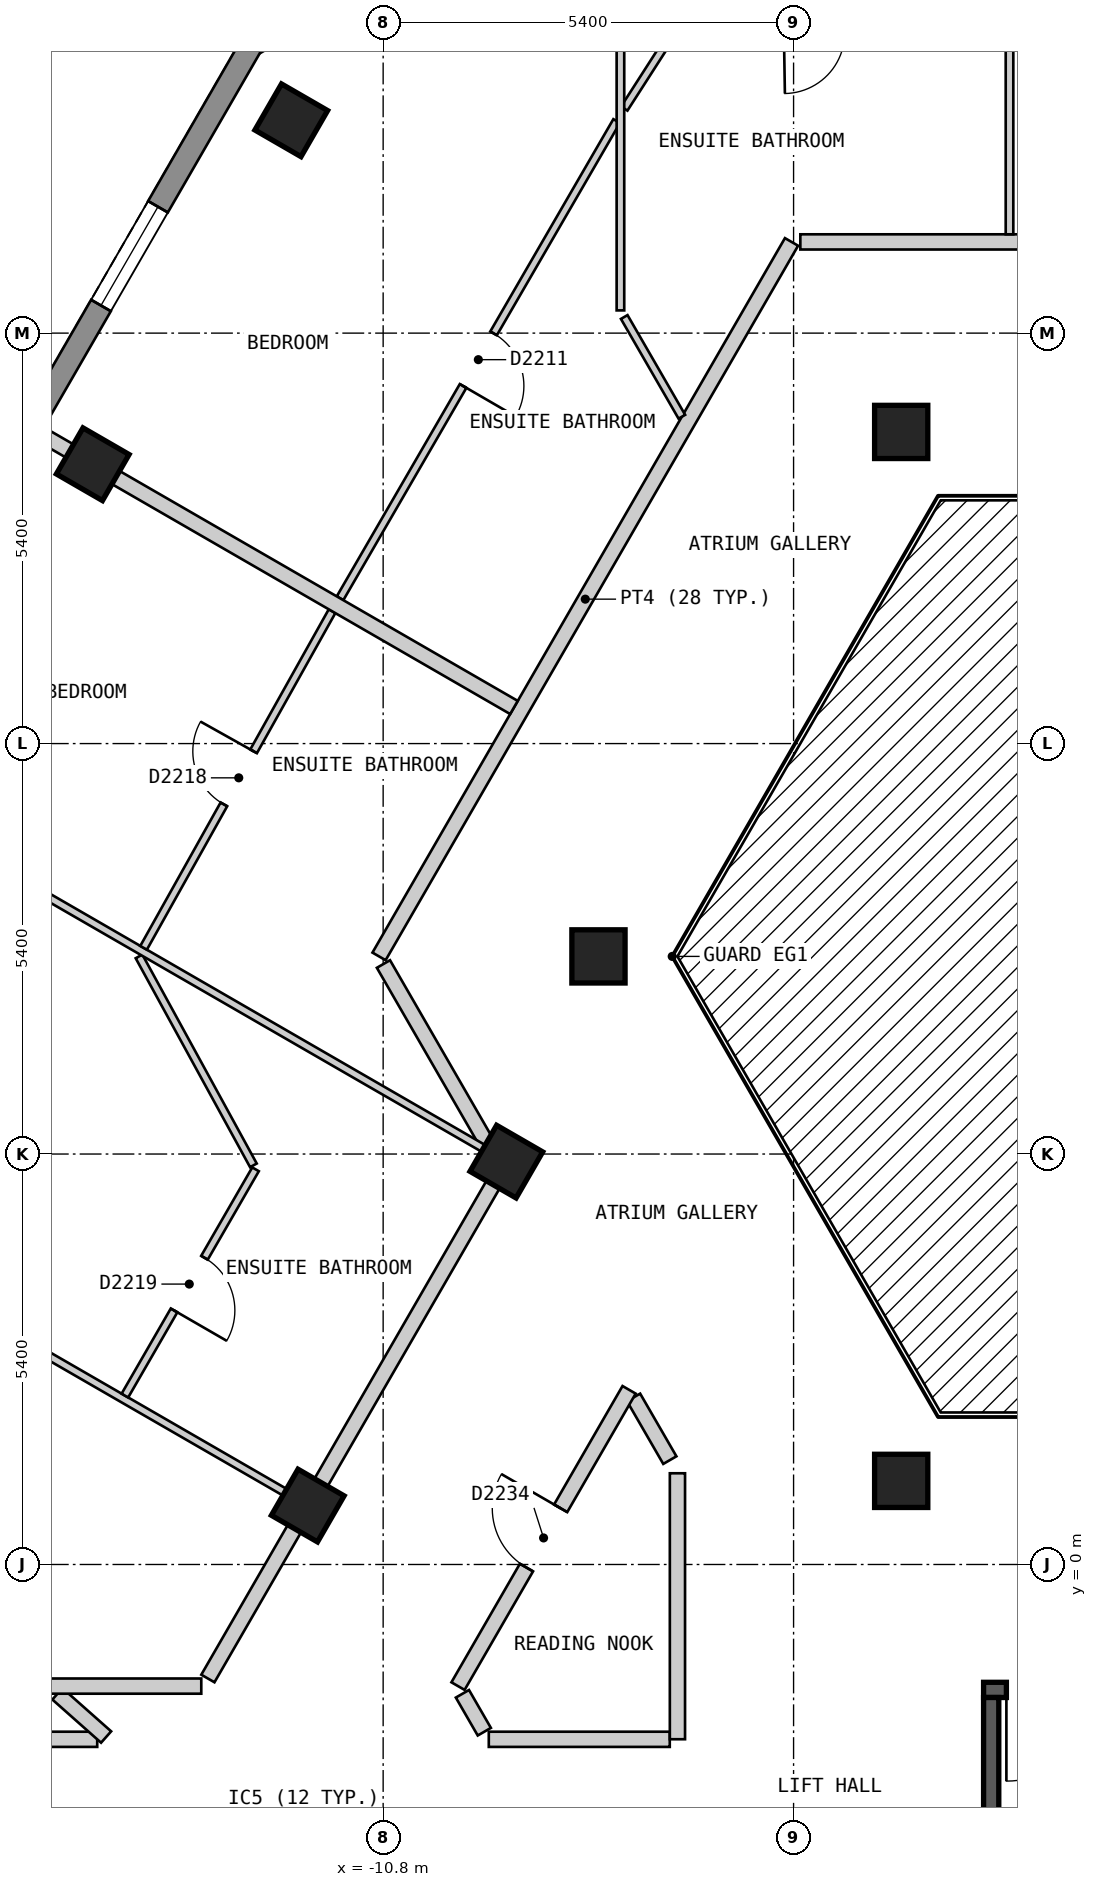
"""IFC4 building model, lengths in metres.
Left out: names, types, materials, properties, quantities, classifications, styles, units other than length and angle.
Written with IfcOpenShell. Run it as: python <this file> out.ifc"""

import sys

from ifc_helpers import new_model, si_unit, direction, frame, frame_2d, origin, origin_2d, place, context, subcontext, project, spatial, polyline, rectangle, outline, extrude, element, fill, save


model = new_model("IFC4")
c1 = context("Model", 3, precision=1e-05, world=origin(), true_north=direction((0.0, 1.0)))
c2 = subcontext(c1, "Body", "Model", "MODEL_VIEW")
j1 = project(units=[si_unit("LENGTHUNIT", "METRE"), si_unit("PLANEANGLEUNIT", "RADIAN")], contexts=[c1])
p1 = place(None, origin())
s1 = spatial("IfcSite", under=j1, at=p1, CompositionType="ELEMENT")
p2 = place(p1, origin())
s2 = spatial("IfcBuilding", under=s1, at=p2, CompositionType="ELEMENT")
p3 = place(p2, frame((0.0, 0.0, 223.8)))
s3 = spatial("IfcBuildingStorey", under=s2, at=p3, CompositionType="ELEMENT", Elevation=223.8)
for number, where, z_axis, x_axis in (
    (1, (-12.009, 19.0, 0.0), (0.0, 0.0, 1.0), (-0.5, -0.866, 0.0)),
    (2, (-14.621, 14.475, 0.0), (0.0, 0.0, 1.0), (-0.5, -0.866, 0.0)),
    (3, (-3.984, 14.9, 0.0), (0.0, 0.0, 1.0), (1.0, 0.0, 0.0)),
    (4, (-7.967, 8.0, 0.0), (0.0, 0.0, 1.0), (1.0, 0.0, 0.0)),
    (5, (-9.179, 5.3, 0.0), (0.0, 0.0, 1.0), (-0.5, -0.866, 0.0)),
    (6, (-3.984, 1.1, 0.0), (0.0, 0.0, 1.0), (1.0, 0.0, 0.0)),
    (7, (-11.792, 0.775, 0.0), (0.0, 0.0, 1.0), (-0.5, -0.866, 0.0)),
):
    element("IfcColumn", number, at=place(p3, frame(where, z_axis=z_axis, x_axis=x_axis)), inside=s3, PredefinedType="COLUMN", context=c2, shape_type="SweptSolid", body=[
        extrude(rectangle(XDim=0.7, YDim=0.7, at=origin_2d()), origin(), (0.0, 0.0, 1.0), 3.0),
    ])
p4 = place(p3, frame((-8.239, 22.47, 0.0), z_axis=(0.0, 0.0, 1.0), x_axis=(-0.866022959057, -0.500004234368, 0.0)))
e8 = element("IfcWall", 8, at=p4, inside=s3, PredefinedType="SOLIDWALL", context=c2, shape_type="SweptSolid", body=[
    extrude(outline(polyline([(0.0, -0.15), (5.0, -0.15), (4.92, 0.15), (0.08, 0.15), (0.0, -0.15)])), origin(), (0.0, 0.0, 1.0), 2.7),
])
p5 = place(p4, frame((0.65, 0.0, 0.15)))
e9 = element("IfcOpeningElement", 9, at=p5, cuts=e8, PredefinedType="OPENING", context=c2, shape_type="SweptSolid", body=[
    extrude(rectangle(XDim=1.2, YDim=2.1, at=frame_2d((0.6, 1.05))), frame((0.0, 0.16, 0.0), z_axis=(0.0, -1.0, 0.0), x_axis=(1.0, 0.0, 0.0)), (0.0, 0.0, 1.0), 0.32),
])
p6 = place(p3, frame((-12.514, 20.025, 0.0), z_axis=(0.0, 0.0, 1.0), x_axis=(-0.500003656944, -0.866023292436, 0.0)))
e10 = element("IfcWall", 10, at=p6, inside=s3, PredefinedType="SOLIDWALL", context=c2, shape_type="SweptSolid", body=[
    extrude(outline(polyline([(0.0, -0.15), (22.17, -0.15), (22.09, 0.15), (0.08, 0.15), (0.0, -0.15)])), origin(), (0.0, 0.0, 1.0), 2.7),
])
p7 = place(p6, frame((2.497, 0.0, 0.15)))
e11 = element("IfcOpeningElement", 11, at=p7, cuts=e10, PredefinedType="OPENING", context=c2, shape_type="SweptSolid", body=[
    extrude(rectangle(XDim=1.5, YDim=2.1, at=frame_2d((0.75, 1.05))), frame((0.0, 0.16, 0.0), z_axis=(0.0, -1.0, 0.0), x_axis=(1.0, 0.0, 0.0)), (0.0, 0.0, 1.0), 0.32),
])
p8 = place(p6, frame((7.722, 0.0, 0.15)))
e12 = element("IfcOpeningElement", 12, at=p8, cuts=e10, PredefinedType="OPENING", context=c2, shape_type="SweptSolid", body=[
    extrude(rectangle(XDim=1.5, YDim=2.1, at=frame_2d((0.75, 1.05))), frame((0.0, 0.16, 0.0), z_axis=(0.0, -1.0, 0.0), x_axis=(1.0, 0.0, 0.0)), (0.0, 0.0, 1.0), 0.32),
])
p9 = place(p6, frame((12.948, 0.0, 0.15)))
e13 = element("IfcOpeningElement", 13, at=p9, cuts=e10, PredefinedType="OPENING", context=c2, shape_type="SweptSolid", body=[
    extrude(rectangle(XDim=1.5, YDim=2.1, at=frame_2d((0.75, 1.05))), frame((0.0, 0.16, 0.0), z_axis=(0.0, -1.0, 0.0), x_axis=(1.0, 0.0, 0.0)), (0.0, 0.0, 1.0), 0.32),
])
p10 = place(p6, frame((18.173, 0.0, 0.15)))
e14 = element("IfcOpeningElement", 14, at=p10, cuts=e10, PredefinedType="OPENING", context=c2, shape_type="SweptSolid", body=[
    extrude(rectangle(XDim=1.5, YDim=2.1, at=frame_2d((0.75, 1.05))), frame((0.0, 0.16, 0.0), z_axis=(0.0, -1.0, 0.0), x_axis=(1.0, 0.0, 0.0)), (0.0, 0.0, 1.0), 0.32),
])
p11 = place(p3, frame((-2.9, -1.65, 0.0), z_axis=(0.0, 0.0, 1.0), x_axis=(1.0, 0.0, 0.0)))
e15 = element("IfcWall", 15, at=p11, inside=s3, PredefinedType="SOLIDWALL", context=c2, shape_type="SweptSolid", body=[
    extrude(rectangle(XDim=5.8, YDim=0.2, at=frame_2d((2.9, 0.0))), origin(), (0.0, 0.0, 1.0), 2.7),
])
p12 = place(p11, frame((0.3, 0.0, 0.0)))
e16 = element("IfcOpeningElement", 16, at=p12, cuts=e15, PredefinedType="OPENING", context=c2, shape_type="SweptSolid", body=[
    extrude(rectangle(XDim=1.2, YDim=2.1, at=frame_2d((0.6, 1.05))), frame((0.0, 0.11, 0.0), z_axis=(0.0, -1.0, 0.0), x_axis=(1.0, 0.0, 0.0)), (0.0, 0.0, 1.0), 0.22),
])
p13 = place(p3, frame((-2.8, -4.5, 0.0), z_axis=(0.0, 0.0, 1.0), x_axis=(0.0, 1.0, 0.0)))
e17 = element("IfcWall", 17, at=p13, inside=s3, PredefinedType="SOLIDWALL", context=c2, shape_type="SweptSolid", body=[
    extrude(rectangle(XDim=2.75, YDim=0.2, at=frame_2d((1.375, 0.0))), origin(), (0.0, 0.0, 1.0), 2.7),
])
p14 = place(p3, frame((-10.796, 7.9, 0.0), z_axis=(0.0, 0.0, 1.0), x_axis=(0.499674397761, -0.866213308731, 0.0)))
e18 = element("IfcWall", 18, at=p14, inside=s3, PredefinedType="PARTITIONING", context=c2, shape_type="SweptSolid", body=[
    extrude(rectangle(XDim=2.785, YDim=0.2, at=frame_2d((1.393, 0.0))), origin(), (0.0, 0.0, 1.0), 2.7),
])
p15 = place(p3, frame((-7.505, 2.198, 0.0), z_axis=(0.0, 0.0, 1.0), x_axis=(0.500409926597, -0.865788603161, 0.0)))
e19 = element("IfcWall", 19, at=p15, inside=s3, PredefinedType="PARTITIONING", context=c2, shape_type="SweptSolid", body=[
    extrude(rectangle(XDim=0.953, YDim=0.2, at=frame_2d((0.477, 0.0))), origin(), (0.0, 0.0, 1.0), 2.7),
])
p16 = place(p3, frame((-9.757, -1.701, 0.0), z_axis=(0.0, 0.0, 1.0), x_axis=(0.49996696679, -0.866044474677, 0.0)))
e20 = element("IfcWall", 20, at=p16, inside=s3, PredefinedType="PARTITIONING", context=c2, shape_type="SweptSolid", body=[
    extrude(rectangle(XDim=0.576, YDim=0.2, at=frame_2d((0.288, 0.0))), origin(), (0.0, 0.0, 1.0), 2.7),
])
p17 = place(p3, frame((-15.899, -2.3, 0.0), z_axis=(0.0, 0.0, 1.0), x_axis=(1.0, 0.0, 0.0)))
e21 = element("IfcWall", 21, at=p17, inside=s3, PredefinedType="PARTITIONING", context=c2, shape_type="SweptSolid", body=[
    extrude(rectangle(XDim=1.337, YDim=0.2, at=frame_2d((0.668, 0.0))), origin(), (0.0, 0.0, 1.0), 2.7),
])
p18 = place(p3, frame((-9.41, -2.3, 0.0), z_axis=(0.0, 0.0, 1.0), x_axis=(1.0, 0.0, 0.0)))
e22 = element("IfcWall", 22, at=p18, inside=s3, PredefinedType="PARTITIONING", context=c2, shape_type="SweptSolid", body=[
    extrude(rectangle(XDim=2.381, YDim=0.2, at=frame_2d((1.19, 0.0))), origin(), (0.0, 0.0, 1.0), 2.7),
])
p19 = place(p3, frame((-5.311, 17.4, 0.0), z_axis=(0.0, 0.0, 1.0), x_axis=(1.0, 0.0, 0.0)))
e23 = element("IfcWall", 23, at=p19, inside=s3, PredefinedType="PARTITIONING", context=c2, shape_type="SweptSolid", body=[
    extrude(rectangle(XDim=10.737, YDim=0.2, at=frame_2d((5.369, 0.0))), origin(), (0.0, 0.0, 1.0), 2.7),
])
p20 = place(p19, frame((4.812, 0.0, 0.0)))
e24 = element("IfcOpeningElement", 24, at=p20, cuts=e23, PredefinedType="OPENING", context=c2, shape_type="SweptSolid", body=[
    extrude(rectangle(XDim=1.0, YDim=2.1, at=frame_2d((0.5, 1.05))), frame((0.0, 0.11, 0.0), z_axis=(0.0, -1.0, 0.0), x_axis=(1.0, 0.0, 0.0)), (0.0, 0.0, 1.0), 0.22),
])
p21 = place(p3, frame((-9.815, -1.6, 0.0), z_axis=(0.0, 0.0, 1.0), x_axis=(0.500058909736, 0.865991389561, 0.0)))
e25 = element("IfcWall", 25, at=p21, inside=s3, PredefinedType="PARTITIONING", context=c2, shape_type="SweptSolid", body=[
    extrude(rectangle(XDim=4.501, YDim=0.2, at=frame_2d((2.251, 0.0))), origin(), (0.0, 0.0, 1.0), 2.7),
])
p22 = place(p21, frame((1.801, 0.0, 0.0)))
e26 = element("IfcOpeningElement", 26, at=p22, cuts=e25, PredefinedType="OPENING", context=c2, shape_type="SweptSolid", body=[
    extrude(rectangle(XDim=0.9, YDim=2.1, at=frame_2d((0.45, 1.05))), frame((0.0, 0.11, 0.0), z_axis=(0.0, -1.0, 0.0), x_axis=(1.0, 0.0, 0.0)), (0.0, 0.0, 1.0), 0.22),
])
p23 = place(p3, frame((-13.106, -1.5, 0.0), z_axis=(0.0, 0.0, 1.0), x_axis=(0.500025705601, 0.86601056214, 0.0)))
e27 = element("IfcWall", 27, at=p23, inside=s3, PredefinedType="PARTITIONING", context=c2, shape_type="SweptSolid", body=[
    extrude(rectangle(XDim=7.735, YDim=0.2, at=frame_2d((3.868, 0.0))), origin(), (0.0, 0.0, 1.0), 2.7),
])
p24 = place(p3, frame((-10.854, 8.0, 0.0), z_axis=(0.0, 0.0, 1.0), x_axis=(0.499997637144, 0.866026767976, 0.0)))
e28 = element("IfcWall", 28, at=p24, inside=s3, PredefinedType="PARTITIONING", context=c2, shape_type="SweptSolid", body=[
    extrude(rectangle(XDim=10.854, YDim=0.2, at=frame_2d((5.427, 0.0))), origin(), (0.0, 0.0, 1.0), 2.7),
])
p25 = place(p3, frame((-6.928, -2.299, 0.0), z_axis=(0.0, 0.0, 1.0), x_axis=(0.0, 1.0, 0.0)))
e29 = element("IfcWall", 29, at=p25, inside=s3, PredefinedType="PARTITIONING", context=c2, shape_type="SweptSolid", body=[
    extrude(rectangle(XDim=3.499, YDim=0.2, at=frame_2d((1.75, 0.0))), origin(), (0.0, 0.0, 1.0), 2.7),
])
p26 = place(p3, frame((-7.628, 16.412, 0.0), z_axis=(0.0, 0.0, 1.0), x_axis=(0.500159472144, -0.86593331292, 0.0)))
e30 = element("IfcWall", 30, at=p26, inside=s3, PredefinedType="PARTITIONING", context=c2, shape_type="SweptSolid", body=[
    extrude(rectangle(XDim=1.515, YDim=0.1, at=frame_2d((0.758, 0.0))), origin(), (0.0, 0.0, 1.0), 2.7),
])
p27 = place(p3, frame((-14.012, 8.0, 0.0), z_axis=(0.0, 0.0, 1.0), x_axis=(0.480183343847, -0.877168145963, 0.0)))
e31 = element("IfcWall", 31, at=p27, inside=s3, PredefinedType="PARTITIONING", context=c2, shape_type="SweptSolid", body=[
    extrude(rectangle(XDim=3.134, YDim=0.1, at=frame_2d((1.567, 0.0))), origin(), (0.0, 0.0, 1.0), 2.7),
])
p28 = place(p3, frame((-2.559, 20.17, 0.0), z_axis=(0.0, 0.0, 1.0), x_axis=(0.0, -1.0, 0.0)))
e32 = element("IfcWall", 32, at=p28, inside=s3, PredefinedType="PARTITIONING", context=c2, shape_type="SweptSolid", body=[
    extrude(rectangle(XDim=2.67, YDim=0.1, at=frame_2d((1.335, 0.0))), origin(), (0.0, 0.0, 1.0), 2.7),
])
p29 = place(p3, frame((-20.539, 5.825, 0.0), z_axis=(0.0, 0.0, 1.0), x_axis=(0.866089650643, -0.499888704662, 0.0)))
e33 = element("IfcWall", 33, at=p29, inside=s3, PredefinedType="PARTITIONING", context=c2, shape_type="SweptSolid", body=[
    extrude(rectangle(XDim=10.0, YDim=0.1, at=frame_2d((5.0, 0.0))), origin(), (0.0, 0.0, 1.0), 2.7),
])
p30 = place(p29, frame((3.196, 0.0, 0.0)))
e34 = element("IfcOpeningElement", 34, at=p30, cuts=e33, PredefinedType="OPENING", context=c2, shape_type="SweptSolid", body=[
    extrude(rectangle(XDim=0.9, YDim=2.1, at=frame_2d((0.45, 1.05))), frame((0.0, 0.06, 0.0), z_axis=(0.0, -1.0, 0.0), x_axis=(1.0, 0.0, 0.0)), (0.0, 0.0, 1.0), 0.12),
])
p31 = place(p3, frame((-17.926, 10.35, 0.0), z_axis=(0.0, 0.0, 1.0), x_axis=(0.866018411306, -0.500012111133, 0.0)))
e35 = element("IfcWall", 35, at=p31, inside=s3, PredefinedType="PARTITIONING", context=c2, shape_type="SweptSolid", body=[
    extrude(rectangle(XDim=9.898, YDim=0.1, at=frame_2d((4.949, 0.0))), origin(), (0.0, 0.0, 1.0), 2.7),
])
p32 = place(p31, frame((1.83, 0.0, 0.0)))
e36 = element("IfcOpeningElement", 36, at=p32, cuts=e35, PredefinedType="OPENING", context=c2, shape_type="SweptSolid", body=[
    extrude(rectangle(XDim=0.9, YDim=2.1, at=frame_2d((0.45, 1.05))), frame((0.0, 0.06, 0.0), z_axis=(0.0, -1.0, 0.0), x_axis=(1.0, 0.0, 0.0)), (0.0, 0.0, 1.0), 0.12),
])
p33 = place(p3, frame((-7.628, 19.154, 0.0), z_axis=(0.0, 0.0, 1.0), x_axis=(0.540600102017, 0.841279697663, 0.0)))
e37 = element("IfcWall", 37, at=p33, inside=s3, PredefinedType="PARTITIONING", context=c2, shape_type="SweptSolid", body=[
    extrude(rectangle(XDim=1.097, YDim=0.1, at=frame_2d((0.548, 0.0))), origin(), (0.0, 0.0, 1.0), 2.7),
])
p34 = place(p3, frame((-14.198, 2.222, 0.0), z_axis=(0.0, 0.0, 1.0), x_axis=(0.500042121486, 0.866001083567, 0.0)))
e38 = element("IfcWall", 38, at=p34, inside=s3, PredefinedType="PARTITIONING", context=c2, shape_type="SweptSolid", body=[
    extrude(rectangle(XDim=3.438, YDim=0.1, at=frame_2d((1.719, 0.0))), origin(), (0.0, 0.0, 1.0), 2.7),
])
p35 = place(p34, frame((1.294, 0.0, 0.0)))
e39 = element("IfcOpeningElement", 39, at=p35, cuts=e38, PredefinedType="OPENING", context=c2, shape_type="SweptSolid", body=[
    extrude(rectangle(XDim=0.8, YDim=2.1, at=frame_2d((0.4, 1.05))), frame((0.0, 0.06, 0.0), z_axis=(0.0, -1.0, 0.0), x_axis=(1.0, 0.0, 0.0)), (0.0, 0.0, 1.0), 0.12),
])
p36 = place(p3, frame((-11.367, 12.712, 0.0), z_axis=(0.0, 0.0, 1.0), x_axis=(0.501473866443, 0.865172792727, 0.0)))
e40 = element("IfcWall", 40, at=p36, inside=s3, PredefinedType="PARTITIONING", context=c2, shape_type="SweptSolid", body=[
    extrude(rectangle(XDim=7.256, YDim=0.1, at=frame_2d((3.628, 0.0))), origin(), (0.0, 0.0, 1.0), 2.7),
])
p37 = place(p36, frame((3.228, 0.0, 0.0)))
e41 = element("IfcOpeningElement", 41, at=p37, cuts=e40, PredefinedType="OPENING", context=c2, shape_type="SweptSolid", body=[
    extrude(rectangle(XDim=0.8, YDim=2.1, at=frame_2d((0.4, 1.05))), frame((0.0, 0.06, 0.0), z_axis=(0.0, -1.0, 0.0), x_axis=(1.0, 0.0, 0.0)), (0.0, 0.0, 1.0), 0.12),
])
p38 = place(p3, frame((-13.952, 8.113, 0.0), z_axis=(0.0, 0.0, 1.0), x_axis=(0.488568218554, 0.872525699231, 0.0)))
e42 = element("IfcWall", 42, at=p38, inside=s3, PredefinedType="PARTITIONING", context=c2, shape_type="SweptSolid", body=[
    extrude(rectangle(XDim=5.076, YDim=0.1, at=frame_2d((2.538, 0.0))), origin(), (0.0, 0.0, 1.0), 2.7),
])
p39 = place(p38, frame((2.163, 0.0, 0.0)))
e43 = element("IfcOpeningElement", 43, at=p39, cuts=e42, PredefinedType="OPENING", context=c2, shape_type="SweptSolid", body=[
    extrude(rectangle(XDim=0.8, YDim=2.1, at=frame_2d((0.4, 1.05))), frame((0.0, 0.06, 0.0), z_axis=(0.0, -1.0, 0.0), x_axis=(1.0, 0.0, 0.0)), (0.0, 0.0, 1.0), 0.12),
])
p40 = place(p3, frame((-7.678, 16.499, 0.0), z_axis=(0.0, 0.0, 1.0), x_axis=(0.0, 1.0, 0.0)))
e44 = element("IfcWall", 44, at=p40, inside=s3, PredefinedType="PARTITIONING", context=c2, shape_type="SweptSolid", body=[
    extrude(rectangle(XDim=5.801, YDim=0.1, at=frame_2d((2.9, 0.0))), origin(), (0.0, 0.0, 1.0), 2.7),
])
p41 = place(p40, frame((3.44, 0.0, 0.0)))
e45 = element("IfcOpeningElement", 45, at=p41, cuts=e44, PredefinedType="OPENING", context=c2, shape_type="SweptSolid", body=[
    extrude(rectangle(XDim=0.9, YDim=2.1, at=frame_2d((0.45, 1.05))), frame((0.0, 0.06, 0.0), z_axis=(0.0, -1.0, 0.0), x_axis=(1.0, 0.0, 0.0)), (0.0, 0.0, 1.0), 0.12),
])
p42 = place(p3, frame((-15.314, 14.875, 0.0), z_axis=(0.0, 0.0, 1.0), x_axis=(0.866001485781, -0.500041424909, 0.0)))
e46 = element("IfcWall", 46, at=p42, inside=s3, PredefinedType="PARTITIONING", context=c2, shape_type="SweptSolid", body=[
    extrude(rectangle(XDim=7.2, YDim=0.2, at=frame_2d((3.6, 0.0))), origin(), (0.0, 0.0, 1.0), 2.7),
])
p43 = place(p3, frame((-15.086, -1.702, 0.0), z_axis=(0.0, 0.0, 1.0), x_axis=(0.748305129876, -0.663354680846, 0.0)))
e47 = element("IfcWall", 47, at=p43, inside=s3, PredefinedType="PARTITIONING", context=c2, shape_type="SweptSolid", body=[
    extrude(rectangle(XDim=0.856, YDim=0.2, at=frame_2d((0.428, 0.0))), origin(), (0.0, 0.0, 1.0), 2.7),
])
p44 = place(p3, frame((-15.198, -1.6, 0.0), z_axis=(0.0, 0.0, 1.0), x_axis=(1.0, 0.0, 0.0)))
e48 = element("IfcWall", 48, at=p44, inside=s3, PredefinedType="PARTITIONING", context=c2, shape_type="SweptSolid", body=[
    extrude(rectangle(XDim=2.005, YDim=0.2, at=frame_2d((1.002, 0.0))), origin(), (0.0, 0.0, 1.0), 2.7),
])
p45 = place(p7, origin())
e49 = element("IfcWindow", 49, at=p45, inside=s3, PartitioningType="SINGLE_PANEL", PredefinedType="WINDOW", context=c2, shape_type="SweptSolid", body=[
    extrude(rectangle(XDim=1.5, YDim=2.1, at=frame_2d((0.75, 1.05))), frame((0.0, 0.03, 0.0), z_axis=(0.0, -1.0, 0.0), x_axis=(1.0, 0.0, 0.0)), (0.0, 0.0, 1.0), 0.06),
])
fill(e11, e49)
p46 = place(p12, origin())
e50 = element("IfcDoor", 50, at=p46, inside=s3, OperationType="SINGLE_SWING_LEFT", PredefinedType="DOOR", context=c2, shape_type="SweptSolid", body=[
    extrude(rectangle(XDim=1.2, YDim=2.1, at=frame_2d((0.6, 1.05))), frame((0.0, 0.025, 0.0), z_axis=(0.0, -1.0, 0.0), x_axis=(1.0, 0.0, 0.0)), (0.0, 0.0, 1.0), 0.05),
])
fill(e16, e50)
p47 = place(p37, origin())
e51 = element("IfcDoor", 51, at=p47, inside=s3, OperationType="SINGLE_SWING_LEFT", PredefinedType="DOOR", context=c2, shape_type="SweptSolid", body=[
    extrude(rectangle(XDim=0.8, YDim=2.1, at=frame_2d((0.4, 1.05))), frame((0.0, 0.025, 0.0), z_axis=(0.0, -1.0, 0.0), x_axis=(1.0, 0.0, 0.0)), (0.0, 0.0, 1.0), 0.05),
])
fill(e41, e51)
p48 = place(p39, origin())
e52 = element("IfcDoor", 52, at=p48, inside=s3, OperationType="SINGLE_SWING_RIGHT", PredefinedType="DOOR", context=c2, shape_type="SweptSolid", body=[
    extrude(rectangle(XDim=0.8, YDim=2.1, at=frame_2d((0.4, 1.05))), frame((0.0, 0.025, 0.0), z_axis=(0.0, -1.0, 0.0), x_axis=(1.0, 0.0, 0.0)), (0.0, 0.0, 1.0), 0.05),
])
fill(e43, e52)
p49 = place(p35, origin())
e53 = element("IfcDoor", 53, at=p49, inside=s3, OperationType="SINGLE_SWING_LEFT", PredefinedType="DOOR", context=c2, shape_type="SweptSolid", body=[
    extrude(rectangle(XDim=0.8, YDim=2.1, at=frame_2d((0.4, 1.05))), frame((0.0, 0.025, 0.0), z_axis=(0.0, -1.0, 0.0), x_axis=(1.0, 0.0, 0.0)), (0.0, 0.0, 1.0), 0.05),
])
fill(e39, e53)
p50 = place(p22, origin())
e54 = element("IfcDoor", 54, at=p50, inside=s3, OperationType="SINGLE_SWING_RIGHT", PredefinedType="DOOR", context=c2, shape_type="SweptSolid", body=[
    extrude(rectangle(XDim=0.9, YDim=2.1, at=frame_2d((0.45, 1.05))), frame((0.0, 0.025, 0.0), z_axis=(0.0, -1.0, 0.0), x_axis=(1.0, 0.0, 0.0)), (0.0, 0.0, 1.0), 0.05),
])
fill(e26, e54)
save(model, sys.argv[1])
